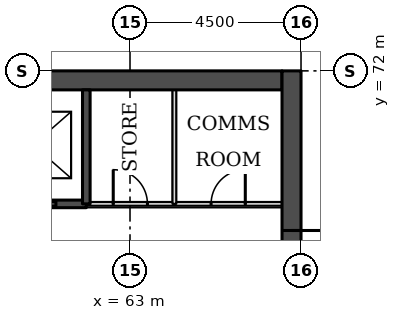
"""IFC4 building model, lengths in metres.
Left out: names, types, materials, properties, quantities, classifications, styles, units other than length and angle.
Written with IfcOpenShell. Run it as: python <this file> out.ifc"""

import sys

from ifc_helpers import new_model, si_unit, direction, frame, frame_2d, origin, place, context, subcontext, project, spatial, rectangle, extrude, element, fill, save


model = new_model("IFC4")
c1 = context("Model", 3, precision=1e-05, world=origin(), true_north=direction((0.0, 1.0)))
c2 = subcontext(c1, "Body", "Model", "MODEL_VIEW")
j1 = project(units=[si_unit("LENGTHUNIT", "METRE"), si_unit("PLANEANGLEUNIT", "RADIAN")], contexts=[c1])
p1 = place(None, origin())
s1 = spatial("IfcSite", under=j1, at=p1, CompositionType="ELEMENT")
p2 = place(p1, origin())
s2 = spatial("IfcBuilding", under=s1, at=p2, CompositionType="ELEMENT")
p3 = place(p2, frame((0.0, 0.0, -4.5)))
s3 = spatial("IfcBuildingStorey", under=s2, at=p3, CompositionType="ELEMENT", Elevation=-4.5)
p4 = place(p3, frame((45.5, 71.75, 0.0), z_axis=(0.0, 0.0, 1.0), x_axis=(1.0, 0.0, 0.0)))
e1 = element("IfcWall", 1, at=p4, inside=s3, PredefinedType="SHEAR", context=c2, shape_type="SweptSolid", body=[
    extrude(rectangle(XDim=21.5, YDim=0.5, at=frame_2d((10.75, 0.0))), origin(), (0.0, 0.0, 1.0), 4.5),
])
p5 = place(p3, frame((67.25, 49.5, 0.0), z_axis=(0.0, 0.0, 1.0), x_axis=(0.0, 1.0, 0.0)))
e2 = element("IfcWall", 2, at=p5, inside=s3, PredefinedType="SHEAR", context=c2, shape_type="SweptSolid", body=[
    extrude(rectangle(XDim=22.5, YDim=0.5, at=frame_2d((11.25, 0.0))), origin(), (0.0, 0.0, 1.0), 4.5),
])
p6 = place(p5, frame((4.2, 0.0, 0.0)))
e3 = element("IfcOpeningElement", 3, at=p6, cuts=e2, PredefinedType="OPENING", context=c2, shape_type="SweptSolid", body=[
    extrude(rectangle(XDim=1.8, YDim=2.1, at=frame_2d((0.9, 1.05))), frame((0.0, 0.26, 0.0), z_axis=(0.0, -1.0, 0.0), x_axis=(1.0, 0.0, 0.0)), (0.0, 0.0, 1.0), 0.52),
])
p7 = place(p5, frame((6.9, 0.0, 0.0)))
e4 = element("IfcOpeningElement", 4, at=p7, cuts=e2, PredefinedType="OPENING", context=c2, shape_type="SweptSolid", body=[
    extrude(rectangle(XDim=1.1, YDim=2.1, at=frame_2d((0.55, 1.05))), frame((0.0, 0.26, 0.0), z_axis=(0.0, -1.0, 0.0), x_axis=(1.0, 0.0, 0.0)), (0.0, 0.0, 1.0), 0.52),
])
p8 = place(p5, frame((13.6, 0.0, 0.0)))
e5 = element("IfcOpeningElement", 5, at=p8, cuts=e2, PredefinedType="OPENING", context=c2, shape_type="SweptSolid", body=[
    extrude(rectangle(XDim=1.1, YDim=2.1, at=frame_2d((0.55, 1.05))), frame((0.0, 0.26, 0.0), z_axis=(0.0, -1.0, 0.0), x_axis=(1.0, 0.0, 0.0)), (0.0, 0.0, 1.0), 0.52),
])
p9 = place(p5, frame((16.5, 0.0, 0.0)))
e6 = element("IfcOpeningElement", 6, at=p9, cuts=e2, PredefinedType="OPENING", context=c2, shape_type="SweptSolid", body=[
    extrude(rectangle(XDim=1.8, YDim=2.1, at=frame_2d((0.9, 1.05))), frame((0.0, 0.26, 0.0), z_axis=(0.0, -1.0, 0.0), x_axis=(1.0, 0.0, 0.0)), (0.0, 0.0, 1.0), 0.52),
])
p10 = place(p3, frame((61.85, 68.5, 0.0), z_axis=(0.0, 0.0, 1.0), x_axis=(1.0, 0.0, 0.0)))
e7 = element("IfcWall", 7, at=p10, inside=s3, PredefinedType="PARTITIONING", context=c2, shape_type="SweptSolid", body=[
    extrude(rectangle(XDim=5.15, YDim=0.1, at=frame_2d((2.575, 0.0))), origin(), (0.0, 0.0, 1.0), 4.1),
])
p11 = place(p10, frame((3.284, 0.0, 0.0)))
e8 = element("IfcOpeningElement", 8, at=p11, cuts=e7, PredefinedType="OPENING", context=c2, shape_type="SweptSolid", body=[
    extrude(rectangle(XDim=0.9, YDim=2.1, at=frame_2d((0.45, 1.05))), frame((0.0, 0.06, 0.0), z_axis=(0.0, -1.0, 0.0), x_axis=(1.0, 0.0, 0.0)), (0.0, 0.0, 1.0), 0.12),
])
p12 = place(p10, frame((0.709, 0.0, 0.0)))
e9 = element("IfcOpeningElement", 9, at=p12, cuts=e7, PredefinedType="OPENING", context=c2, shape_type="SweptSolid", body=[
    extrude(rectangle(XDim=0.9, YDim=2.1, at=frame_2d((0.45, 1.05))), frame((0.0, 0.06, 0.0), z_axis=(0.0, -1.0, 0.0), x_axis=(1.0, 0.0, 0.0)), (0.0, 0.0, 1.0), 0.12),
])
p13 = place(p3, frame((50.65, 68.5, 0.0), z_axis=(0.0, 0.0, 1.0), x_axis=(1.0, 0.0, 0.0)))
e10 = element("IfcWall", 10, at=p13, inside=s3, PredefinedType="SOLIDWALL", context=c2, shape_type="SweptSolid", body=[
    extrude(rectangle(XDim=11.2, YDim=0.2, at=frame_2d((5.6, 0.0))), origin(), (0.0, 0.0, 1.0), 4.1),
])
p14 = place(p13, frame((0.8, 0.0, 0.0)))
e11 = element("IfcOpeningElement", 11, at=p14, cuts=e10, PredefinedType="OPENING", context=c2, shape_type="SweptSolid", body=[
    extrude(rectangle(XDim=1.2, YDim=2.1, at=frame_2d((0.6, 1.05))), frame((0.0, 0.11, 0.0), z_axis=(0.0, -1.0, 0.0), x_axis=(1.0, 0.0, 0.0)), (0.0, 0.0, 1.0), 0.22),
])
p15 = place(p13, frame((3.6, 0.0, 0.0)))
e12 = element("IfcOpeningElement", 12, at=p15, cuts=e10, PredefinedType="OPENING", context=c2, shape_type="SweptSolid", body=[
    extrude(rectangle(XDim=1.2, YDim=2.1, at=frame_2d((0.6, 1.05))), frame((0.0, 0.11, 0.0), z_axis=(0.0, -1.0, 0.0), x_axis=(1.0, 0.0, 0.0)), (0.0, 0.0, 1.0), 0.22),
])
p16 = place(p13, frame((6.4, 0.0, 0.0)))
e13 = element("IfcOpeningElement", 13, at=p16, cuts=e10, PredefinedType="OPENING", context=c2, shape_type="SweptSolid", body=[
    extrude(rectangle(XDim=1.2, YDim=2.1, at=frame_2d((0.6, 1.05))), frame((0.0, 0.11, 0.0), z_axis=(0.0, -1.0, 0.0), x_axis=(1.0, 0.0, 0.0)), (0.0, 0.0, 1.0), 0.22),
])
p17 = place(p13, frame((9.2, 0.0, 0.0)))
e14 = element("IfcOpeningElement", 14, at=p17, cuts=e10, PredefinedType="OPENING", context=c2, shape_type="SweptSolid", body=[
    extrude(rectangle(XDim=1.2, YDim=2.1, at=frame_2d((0.6, 1.05))), frame((0.0, 0.11, 0.0), z_axis=(0.0, -1.0, 0.0), x_axis=(1.0, 0.0, 0.0)), (0.0, 0.0, 1.0), 0.22),
])
p18 = place(p3, frame((61.85, 68.5, 0.0), z_axis=(0.0, 0.0, 1.0), x_axis=(0.0, 1.0, 0.0)))
e15 = element("IfcWall", 15, at=p18, inside=s3, PredefinedType="SOLIDWALL", context=c2, shape_type="SweptSolid", body=[
    extrude(rectangle(XDim=3.0, YDim=0.2, at=frame_2d((1.5, 0.0))), origin(), (0.0, 0.0, 1.0), 4.1),
])
p19 = place(p3, frame((64.167, 68.5, 0.0), z_axis=(0.0, 0.0, 1.0), x_axis=(0.0, 1.0, 0.0)))
e16 = element("IfcWall", 16, at=p19, inside=s3, PredefinedType="PARTITIONING", context=c2, shape_type="SweptSolid", body=[
    extrude(rectangle(XDim=3.0, YDim=0.1, at=frame_2d((1.5, 0.0))), origin(), (0.0, 0.0, 1.0), 4.1),
])
p20 = place(p17, origin())
e17 = element("IfcDoor", 17, at=p20, inside=s3, OperationType="DOUBLE_DOOR_SLIDING", PredefinedType="DOOR", context=c2, shape_type="SweptSolid", body=[
    extrude(rectangle(XDim=1.2, YDim=2.1, at=frame_2d((0.6, 1.05))), frame((0.0, 0.025, 0.0), z_axis=(0.0, -1.0, 0.0), x_axis=(1.0, 0.0, 0.0)), (0.0, 0.0, 1.0), 0.05),
])
fill(e14, e17)
p21 = place(p9, frame((1.8, 0.0, 0.0), z_axis=(0.0, 0.0, 1.0), x_axis=(-1.0, 0.0, 0.0)))
e18 = element("IfcDoor", 18, at=p21, inside=s3, OperationType="SINGLE_SWING_LEFT", PredefinedType="DOOR", context=c2, shape_type="SweptSolid", body=[
    extrude(rectangle(XDim=1.8, YDim=2.1, at=frame_2d((0.9, 1.05))), frame((0.0, 0.025, 0.0), z_axis=(0.0, -1.0, 0.0), x_axis=(1.0, 0.0, 0.0)), (0.0, 0.0, 1.0), 0.05),
])
fill(e6, e18)
p22 = place(p11, origin())
e19 = element("IfcDoor", 19, at=p22, inside=s3, OperationType="SINGLE_SWING_RIGHT", PredefinedType="DOOR", context=c2, shape_type="SweptSolid", body=[
    extrude(rectangle(XDim=0.9, YDim=2.1, at=frame_2d((0.45, 1.05))), frame((0.0, 0.025, 0.0), z_axis=(0.0, -1.0, 0.0), x_axis=(1.0, 0.0, 0.0)), (0.0, 0.0, 1.0), 0.05),
])
fill(e8, e19)
p23 = place(p12, origin())
e20 = element("IfcDoor", 20, at=p23, inside=s3, OperationType="SINGLE_SWING_LEFT", PredefinedType="DOOR", context=c2, shape_type="SweptSolid", body=[
    extrude(rectangle(XDim=0.9, YDim=2.1, at=frame_2d((0.45, 1.05))), frame((0.0, 0.025, 0.0), z_axis=(0.0, -1.0, 0.0), x_axis=(1.0, 0.0, 0.0)), (0.0, 0.0, 1.0), 0.05),
])
fill(e9, e20)
save(model, sys.argv[1])
